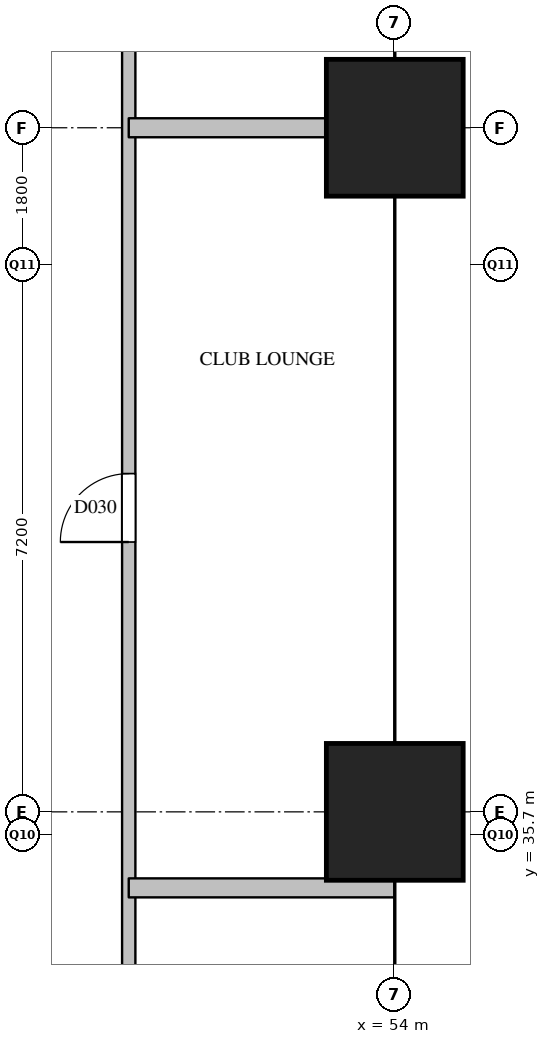
"""IFC4 building model, lengths in metres.
Left out: names, types, materials, properties, quantities, classifications, styles, units other than length and angle.
Written with IfcOpenShell. Run it as: python <this file> out.ifc"""

import sys

from ifc_helpers import new_model, si_unit, direction, frame, frame_2d, origin, origin_2d, place, context, subcontext, project, spatial, rectangle, extrude, element, fill, save


model = new_model("IFC4")
c1 = context("Model", 3, precision=1e-05, world=origin(), true_north=direction((0.0, 1.0)))
c2 = subcontext(c1, "Body", "Model", "MODEL_VIEW")
j1 = project(units=[si_unit("LENGTHUNIT", "METRE"), si_unit("PLANEANGLEUNIT", "RADIAN")], contexts=[c1])
p1 = place(None, origin())
s1 = spatial("IfcSite", under=j1, at=p1, CompositionType="ELEMENT")
p2 = place(p1, origin())
s2 = spatial("IfcBuilding", under=s1, at=p2, CompositionType="ELEMENT")
p3 = place(p2, frame((0.0, 0.0, 85.4)))
s3 = spatial("IfcBuildingStorey", under=s2, at=p3, CompositionType="ELEMENT", Elevation=85.4)
for number, where, z_axis, x_axis in (
    (1, (54.0, 36.0, 0.0), (0.0, 0.0, 1.0), (1.0, 0.0, 0.0)),
    (2, (54.0, 45.0, 0.0), (0.0, 0.0, 1.0), (1.0, 0.0, 0.0)),
):
    element("IfcColumn", number, at=place(p3, frame(where, z_axis=z_axis, x_axis=x_axis)), inside=s3, PredefinedType="COLUMN", context=c2, shape_type="SweptSolid", body=[
        extrude(rectangle(XDim=1.8, YDim=1.8, at=origin_2d()), origin(), (0.0, 0.0, 1.0), 3.8),
    ])
p4 = place(p3, frame((50.5, 26.4, 0.0), z_axis=(0.0, 0.0, 1.0), x_axis=(0.0, 1.0, 0.0)))
e3 = element("IfcWall", 3, at=p4, inside=s3, PredefinedType="PARTITIONING", context=c2, shape_type="SweptSolid", body=[
    extrude(rectangle(XDim=25.7, YDim=0.175, at=frame_2d((12.85, 0.0))), origin(), (0.0, 0.0, 1.0), 2.5),
])
p5 = place(p4, frame((3.85, 0.0, 0.0)))
e4 = element("IfcOpeningElement", 4, at=p5, cuts=e3, PredefinedType="OPENING", context=c2, shape_type="SweptSolid", body=[
    extrude(rectangle(XDim=0.9, YDim=2.1, at=frame_2d((0.45, 1.05))), frame((0.0, 0.097, 0.0), z_axis=(0.0, -1.0, 0.0), x_axis=(1.0, 0.0, 0.0)), (0.0, 0.0, 1.0), 0.195),
])
p6 = place(p4, frame((13.15, 0.0, 0.0)))
e5 = element("IfcOpeningElement", 5, at=p6, cuts=e3, PredefinedType="OPENING", context=c2, shape_type="SweptSolid", body=[
    extrude(rectangle(XDim=0.9, YDim=2.1, at=frame_2d((0.45, 1.05))), frame((0.0, 0.097, 0.0), z_axis=(0.0, -1.0, 0.0), x_axis=(1.0, 0.0, 0.0)), (0.0, 0.0, 1.0), 0.195),
])
p7 = place(p4, frame((21.7, 0.0, 0.0)))
e6 = element("IfcOpeningElement", 6, at=p7, cuts=e3, PredefinedType="OPENING", context=c2, shape_type="SweptSolid", body=[
    extrude(rectangle(XDim=0.9, YDim=2.1, at=frame_2d((0.45, 1.05))), frame((0.0, 0.097, 0.0), z_axis=(0.0, -1.0, 0.0), x_axis=(1.0, 0.0, 0.0)), (0.0, 0.0, 1.0), 0.195),
])
p8 = place(p3, frame((50.5, 35.0, 0.0), z_axis=(0.0, 0.0, 1.0), x_axis=(1.0, 0.0, 0.0)))
e7 = element("IfcWall", 7, at=p8, inside=s3, PredefinedType="PARTITIONING", context=c2, shape_type="SweptSolid", body=[
    extrude(rectangle(XDim=3.5, YDim=0.25, at=frame_2d((1.75, 0.0))), origin(), (0.0, 0.0, 1.0), 2.5),
])
p9 = place(p3, frame((50.5, 45.0, 0.0), z_axis=(0.0, 0.0, 1.0), x_axis=(1.0, 0.0, 0.0)))
e8 = element("IfcWall", 8, at=p9, inside=s3, PredefinedType="PARTITIONING", context=c2, shape_type="SweptSolid", body=[
    extrude(rectangle(XDim=3.5, YDim=0.25, at=frame_2d((1.75, 0.0))), origin(), (0.0, 0.0, 1.0), 3.5),
])
p10 = place(p6, origin())
e9 = element("IfcDoor", 9, at=p10, inside=s3, OperationType="SINGLE_SWING_LEFT", PredefinedType="DOOR", context=c2, shape_type="SweptSolid", body=[
    extrude(rectangle(XDim=0.9, YDim=2.1, at=frame_2d((0.45, 1.05))), frame((0.0, 0.025, 0.0), z_axis=(0.0, -1.0, 0.0), x_axis=(1.0, 0.0, 0.0)), (0.0, 0.0, 1.0), 0.05),
])
fill(e5, e9)
save(model, sys.argv[1])
